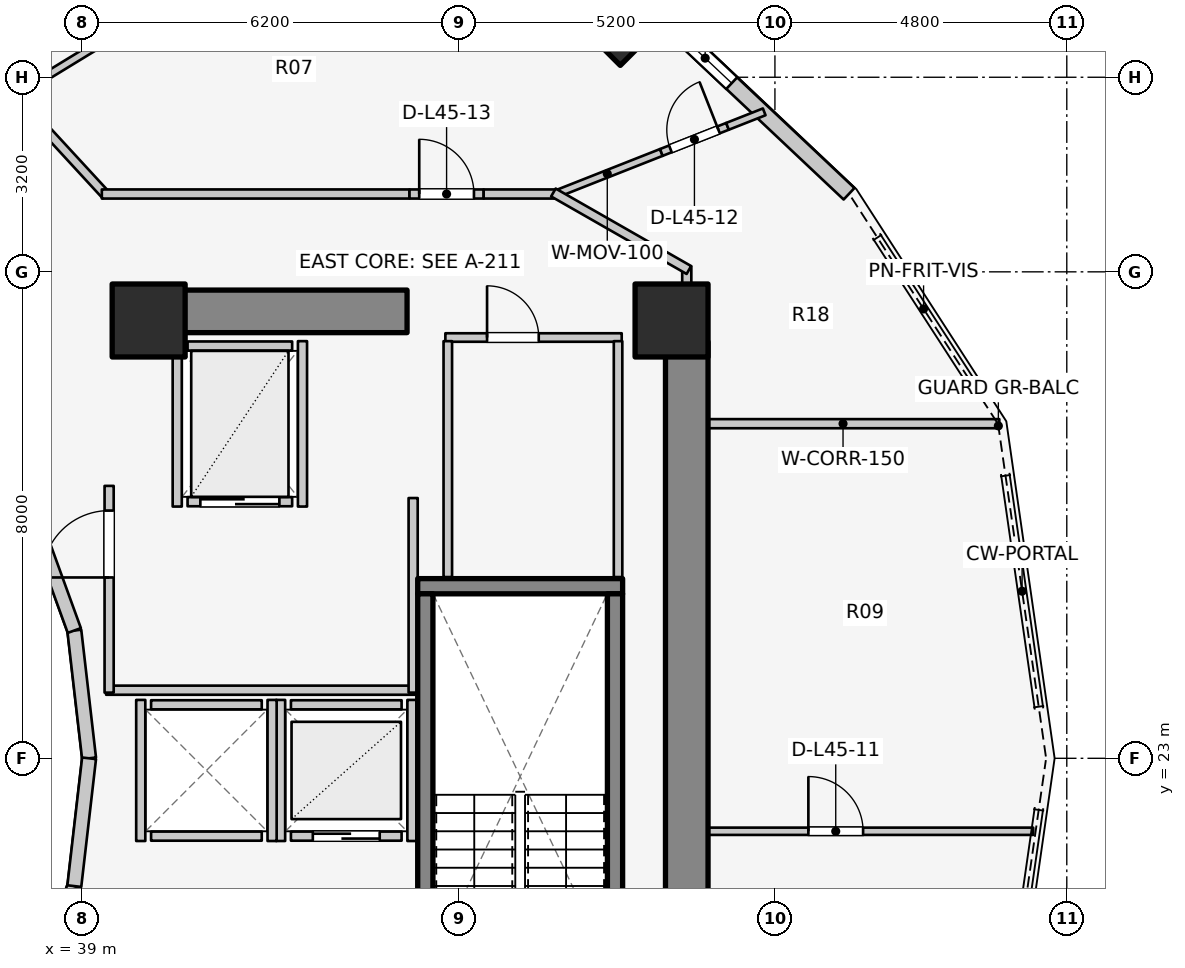
"""IFC4 building model, lengths in metres.
Left out: names, types, materials, properties, quantities, classifications, styles, units other than length and angle.
Written with IfcOpenShell. Run it as: python <this file> out.ifc"""

import sys

from ifc_helpers import new_model, si_unit, direction, frame, frame_2d, origin, origin_2d, place, context, subcontext, project, spatial, rectangle, extrude, element, fill, save


model = new_model("IFC4")
c1 = context("Model", 3, precision=1e-05, world=origin(), true_north=direction((0.0, 1.0)))
c2 = subcontext(c1, "Body", "Model", "MODEL_VIEW")
j1 = project(units=[si_unit("LENGTHUNIT", "METRE"), si_unit("PLANEANGLEUNIT", "RADIAN")], contexts=[c1])
p1 = place(None, origin())
s1 = spatial("IfcSite", under=j1, at=p1, CompositionType="ELEMENT")
p2 = place(p1, origin())
s2 = spatial("IfcBuilding", under=s1, at=p2, CompositionType="ELEMENT")
p3 = place(p2, frame((0.0, 0.0, 149.8)))
s3 = spatial("IfcBuildingStorey", under=s2, at=p3, CompositionType="ELEMENT", Elevation=149.8)
p4 = place(p3, frame((48.95, 17.05, 0.0), z_axis=(0.0, 0.0, 1.0), x_axis=(0.0, 1.0, 0.0)))
e1 = element("IfcWall", 1, at=p4, inside=s3, PredefinedType="SHEAR", context=c2, shape_type="SweptSolid", body=[
    extrude(rectangle(XDim=12.8, YDim=0.7, at=frame_2d((6.4, 0.0))), origin(), (0.0, 0.0, 1.0), 3.1),
])
p5 = place(p3, frame((39.85, 30.35, 0.0), z_axis=(0.0, 0.0, 1.0), x_axis=(1.0, 0.0, 0.0)))
e2 = element("IfcWall", 2, at=p5, inside=s3, PredefinedType="SHEAR", context=c2, shape_type="SweptSolid", body=[
    extrude(rectangle(XDim=4.5, YDim=0.7, at=frame_2d((2.25, 0.0))), origin(), (0.0, 0.0, 1.0), 3.1),
])
p6 = place(p3, frame((44.525, 25.83, 0.0), z_axis=(0.0, 0.0, 1.0), x_axis=(1.0, 0.0, 0.0)))
e3 = element("IfcWall", 3, at=p6, inside=s3, PredefinedType="SOLIDWALL", context=c2, shape_type="SweptSolid", body=[
    extrude(rectangle(XDim=3.37, YDim=0.25, at=frame_2d((1.685, 0.0))), origin(), (0.0, 0.0, 1.0), 3.1),
])
for number, where, z_axis, x_axis in (
    (4, (44.65, 17.895, 0.0), (0.0, 0.0, 1.0), (0.0, 1.0, 0.0)),
    (5, (47.77, 17.895, 0.0), (0.0, 0.0, 1.0), (0.0, 1.0, 0.0)),
):
    element("IfcWall", number, at=place(p3, frame(where, z_axis=z_axis, x_axis=x_axis)), inside=s3, PredefinedType="SOLIDWALL", context=c2, shape_type="SweptSolid", body=[
        extrude(rectangle(XDim=7.81, YDim=0.25, at=frame_2d((3.905, 0.0))), origin(), (0.0, 0.0, 1.0), 3.1),
    ])
for number, where, z_axis, x_axis in (
    (6, (48.7, 30.2, 0.0), (0.0, 0.0, 1.0), (1.0, 0.0, 0.0)),
    (7, (40.1, 30.2, 0.0), (0.0, 0.0, 1.0), (1.0, 0.0, 0.0)),
):
    element("IfcColumn", number, at=place(p3, frame(where, z_axis=z_axis, x_axis=x_axis)), inside=s3, PredefinedType="COLUMN", context=c2, shape_type="SweptSolid", body=[
        extrude(rectangle(XDim=1.2, YDim=1.2, at=origin_2d()), origin(), (0.0, 0.0, 1.0), 3.1),
    ])
p7 = place(p3, frame((47.857, 35.031, 0.0), z_axis=(0.0, 0.0, 1.0), x_axis=(0.707106781187, 0.707106781187, 0.0)))
e8 = element("IfcColumn", 8, at=p7, inside=s3, PredefinedType="COLUMN", context=c2, shape_type="SweptSolid", body=[
    extrude(rectangle(XDim=0.9, YDim=0.9, at=origin_2d()), origin(), (0.0, 0.0, 1.0), 3.1),
])
p8 = place(p3, frame((39.12, 23.0, 0.0), z_axis=(0.0, 0.0, 1.0), x_axis=(-0.114711713601, 0.993398823617, 0.0)))
e9 = element("IfcWall", 9, at=p8, inside=s3, PredefinedType="STANDARD", context=c2, shape_type="SweptSolid", body=[
    extrude(rectangle(XDim=2.115, YDim=0.23, at=frame_2d((1.058, 0.0))), origin(), (0.0, 0.0, 1.0), 2.56),
])
for number, where, z_axis, x_axis in (
    (10, (38.877, 25.102, 0.0), (0.0, 0.0, 1.0), (-0.341, 0.94, 0.0)),
    (11, (38.166, 18.94, 0.0), (0.0, 0.0, 1.0), (0.341, 0.94, 0.0)),
):
    element("IfcWall", number, at=place(p3, frame(where, z_axis=z_axis, x_axis=x_axis)), inside=s3, PredefinedType="STANDARD", context=c2, shape_type="SweptSolid", body=[
        extrude(rectangle(XDim=2.084, YDim=0.23, at=frame_2d((1.042, 0.0))), origin(), (0.0, 0.0, 1.0), 2.56),
    ])
p9 = place(p3, frame((38.877, 20.898, 0.0), z_axis=(0.0, 0.0, 1.0), x_axis=(0.114711713601, 0.993398823617, 0.0)))
e12 = element("IfcWall", 12, at=p9, inside=s3, PredefinedType="STANDARD", context=c2, shape_type="SweptSolid", body=[
    extrude(rectangle(XDim=2.115, YDim=0.23, at=frame_2d((1.058, 0.0))), origin(), (0.0, 0.0, 1.0), 2.56),
])
p10 = place(p3, frame((51.619, 32.284, 0.0), z_axis=(0.0, 0.0, 1.0), x_axis=(-0.727667301037, 0.68593024354, 0.0)))
e13 = element("IfcWall", 13, at=p10, inside=s3, PredefinedType="STANDARD", context=c2, shape_type="SweptSolid", body=[
    extrude(rectangle(XDim=4.604, YDim=0.26, at=frame_2d((2.302, 0.0))), origin(), (0.0, 0.0, 1.0), 1.22),
])
p11 = place(p10, frame((2.652, 0.0, 0.15)))
e14 = element("IfcOpeningElement", 14, at=p11, cuts=e13, PredefinedType="OPENING", context=c2, shape_type="SweptSolid", body=[
    extrude(rectangle(XDim=1.2, YDim=0.9, at=frame_2d((0.6, 0.45))), frame((0.0, 0.14, 0.0), z_axis=(0.0, -1.0, 0.0), x_axis=(1.0, 0.0, 0.0)), (0.0, 0.0, 1.0), 0.28),
])
p12 = place(p3, frame((42.44, 21.72, 0.0), z_axis=(0.0, 0.0, 1.0), x_axis=(1.0, 0.0, 0.0)))
e15 = element("IfcWall", 15, at=p12, inside=s3, PredefinedType="SOLIDWALL", context=c2, shape_type="SweptSolid", body=[
    extrude(rectangle(XDim=1.82, YDim=0.15, at=frame_2d((0.91, 0.0))), origin(), (0.0, 0.0, 1.0), 2.575),
])
p13 = place(p12, frame((0.36, 0.0, 0.0)))
e16 = element("IfcOpeningElement", 16, at=p13, cuts=e15, PredefinedType="OPENING", context=c2, shape_type="SweptSolid", body=[
    extrude(rectangle(XDim=1.1, YDim=2.1, at=frame_2d((0.55, 1.05))), frame((0.0, 0.085, 0.0), z_axis=(0.0, -1.0, 0.0), x_axis=(1.0, 0.0, 0.0)), (0.0, 0.0, 1.0), 0.17),
])
p14 = place(p3, frame((42.44, 23.88, 0.0), z_axis=(0.0, 0.0, 1.0), x_axis=(1.0, 0.0, 0.0)))
e17 = element("IfcWall", 17, at=p14, inside=s3, PredefinedType="SOLIDWALL", context=c2, shape_type="SweptSolid", body=[
    extrude(rectangle(XDim=1.82, YDim=0.15, at=frame_2d((0.91, 0.0))), origin(), (0.0, 0.0, 1.0), 2.575),
])
for number, where, z_axis, x_axis in (
    (18, (42.27, 21.64, 0.0), (0.0, 0.0, 1.0), (0.0, 1.0, 0.0)),
    (19, (44.43, 21.64, 0.0), (0.0, 0.0, 1.0), (0.0, 1.0, 0.0)),
):
    element("IfcWall", number, at=place(p3, frame(where, z_axis=z_axis, x_axis=x_axis)), inside=s3, PredefinedType="SOLIDWALL", context=c2, shape_type="SweptSolid", body=[
        extrude(rectangle(XDim=2.32, YDim=0.15, at=frame_2d((1.16, 0.0))), origin(), (0.0, 0.0, 1.0), 2.575),
    ])
for number, where, z_axis, x_axis in (
    (20, (40.14, 21.72, 0.0), (0.0, 0.0, 1.0), (1.0, 0.0, 0.0)),
    (21, (40.14, 23.88, 0.0), (0.0, 0.0, 1.0), (1.0, 0.0, 0.0)),
):
    element("IfcWall", number, at=place(p3, frame(where, z_axis=z_axis, x_axis=x_axis)), inside=s3, PredefinedType="SOLIDWALL", context=c2, shape_type="SweptSolid", body=[
        extrude(rectangle(XDim=1.82, YDim=0.15, at=frame_2d((0.91, 0.0))), origin(), (0.0, 0.0, 1.0), 2.12),
    ])
p15 = place(p3, frame((39.97, 21.64, 0.0), z_axis=(0.0, 0.0, 1.0), x_axis=(0.0, 1.0, 0.0)))
e22 = element("IfcWall", 22, at=p15, inside=s3, PredefinedType="SOLIDWALL", context=c2, shape_type="SweptSolid", body=[
    extrude(rectangle(XDim=2.32, YDim=0.15, at=frame_2d((1.16, 0.0))), origin(), (0.0, 0.0, 1.0), 2.12),
])
p16 = place(p3, frame((42.13, 21.64, 0.0), z_axis=(0.0, 0.0, 1.0), x_axis=(0.0, 1.0, 0.0)))
e23 = element("IfcWall", 23, at=p16, inside=s3, PredefinedType="SOLIDWALL", context=c2, shape_type="SweptSolid", body=[
    extrude(rectangle(XDim=2.32, YDim=0.15, at=frame_2d((1.16, 0.0))), origin(), (0.0, 0.0, 1.0), 2.575),
])
p17 = place(p3, frame((40.74, 27.22, 0.0), z_axis=(0.0, 0.0, 1.0), x_axis=(1.0, 0.0, 0.0)))
e24 = element("IfcWall", 24, at=p17, inside=s3, PredefinedType="SOLIDWALL", context=c2, shape_type="SweptSolid", body=[
    extrude(rectangle(XDim=1.72, YDim=0.15, at=frame_2d((0.86, 0.0))), origin(), (0.0, 0.0, 1.0), 2.575),
])
p18 = place(p17, frame((0.21, 0.0, 0.0)))
e25 = element("IfcOpeningElement", 25, at=p18, cuts=e24, PredefinedType="OPENING", context=c2, shape_type="SweptSolid", body=[
    extrude(rectangle(XDim=1.3, YDim=2.1, at=frame_2d((0.65, 1.05))), frame((0.0, 0.085, 0.0), z_axis=(0.0, -1.0, 0.0), x_axis=(1.0, 0.0, 0.0)), (0.0, 0.0, 1.0), 0.17),
])
p19 = place(p3, frame((40.74, 29.78, 0.0), z_axis=(0.0, 0.0, 1.0), x_axis=(1.0, 0.0, 0.0)))
e26 = element("IfcWall", 26, at=p19, inside=s3, PredefinedType="SOLIDWALL", context=c2, shape_type="SweptSolid", body=[
    extrude(rectangle(XDim=1.72, YDim=0.15, at=frame_2d((0.86, 0.0))), origin(), (0.0, 0.0, 1.0), 2.575),
])
for number, where, z_axis, x_axis in (
    (27, (40.57, 27.14, 0.0), (0.0, 0.0, 1.0), (0.0, 1.0, 0.0)),
    (28, (42.63, 27.14, 0.0), (0.0, 0.0, 1.0), (0.0, 1.0, 0.0)),
):
    element("IfcWall", number, at=place(p3, frame(where, z_axis=z_axis, x_axis=x_axis)), inside=s3, PredefinedType="SOLIDWALL", context=c2, shape_type="SweptSolid", body=[
        extrude(rectangle(XDim=2.72, YDim=0.15, at=frame_2d((1.36, 0.0))), origin(), (0.0, 0.0, 1.0), 2.575),
    ])
p20 = place(p3, frame((39.4, 24.12, 0.0), z_axis=(0.0, 0.0, 1.0), x_axis=(1.0, 0.0, 0.0)))
e29 = element("IfcWall", 29, at=p20, inside=s3, PredefinedType="PARTITIONING", context=c2, shape_type="SweptSolid", body=[
    extrude(rectangle(XDim=5.08, YDim=0.15, at=frame_2d((2.54, 0.0))), origin(), (0.0, 0.0, 1.0), 2.12),
])
p21 = place(p3, frame((44.45, 24.08, 0.0), z_axis=(0.0, 0.0, 1.0), x_axis=(0.0, 1.0, 0.0)))
e30 = element("IfcWall", 30, at=p21, inside=s3, PredefinedType="PARTITIONING", context=c2, shape_type="SweptSolid", body=[
    extrude(rectangle(XDim=3.2, YDim=0.15, at=frame_2d((1.6, 0.0))), origin(), (0.0, 0.0, 1.0), 2.575),
])
p22 = place(p3, frame((39.45, 24.08, 0.0), z_axis=(0.0, 0.0, 1.0), x_axis=(0.0, 1.0, 0.0)))
e31 = element("IfcWall", 31, at=p22, inside=s3, PredefinedType="PARTITIONING", context=c2, shape_type="SweptSolid", body=[
    extrude(rectangle(XDim=3.4, YDim=0.15, at=frame_2d((1.7, 0.0))), origin(), (0.0, 0.0, 1.0), 2.575),
])
p23 = place(p22, frame((1.894, 0.0, 0.0)))
e32 = element("IfcOpeningElement", 32, at=p23, cuts=e31, PredefinedType="OPENING", context=c2, shape_type="SweptSolid", body=[
    extrude(rectangle(XDim=1.1, YDim=2.1, at=frame_2d((0.55, 1.05))), frame((0.0, 0.085, 0.0), z_axis=(0.0, -1.0, 0.0), x_axis=(1.0, 0.0, 0.0)), (0.0, 0.0, 1.0), 0.17),
])
p24 = place(p3, frame((44.98, 29.92, 0.0), z_axis=(0.0, 0.0, 1.0), x_axis=(1.0, 0.0, 0.0)))
e33 = element("IfcWall", 33, at=p24, inside=s3, PredefinedType="PLUMBINGWALL", context=c2, shape_type="SweptSolid", body=[
    extrude(rectangle(XDim=2.9, YDim=0.14, at=frame_2d((1.45, 0.0))), origin(), (0.0, 0.0, 1.0), 2.575),
])
p25 = place(p24, frame((0.686, 0.0, 0.0)))
e34 = element("IfcOpeningElement", 34, at=p25, cuts=e33, PredefinedType="OPENING", context=c2, shape_type="SweptSolid", body=[
    extrude(rectangle(XDim=0.85, YDim=2.05, at=frame_2d((0.425, 1.025))), frame((0.0, 0.08, 0.0), z_axis=(0.0, -1.0, 0.0), x_axis=(1.0, 0.0, 0.0)), (0.0, 0.0, 1.0), 0.16),
])
for number, where, z_axis, x_axis in (
    (35, (45.02, 25.98, 0.0), (0.0, 0.0, 1.0), (0.0, 1.0, 0.0)),
    (36, (47.82, 25.98, 0.0), (0.0, 0.0, 1.0), (0.0, 1.0, 0.0)),
):
    element("IfcWall", number, at=place(p3, frame(where, z_axis=z_axis, x_axis=x_axis)), inside=s3, PredefinedType="PLUMBINGWALL", context=c2, shape_type="SweptSolid", body=[
        extrude(rectangle(XDim=3.88, YDim=0.14, at=frame_2d((1.94, 0.0))), origin(), (0.0, 0.0, 1.0), 2.575),
    ])
p26 = place(p3, frame((48.95, 28.503, 0.0), z_axis=(0.0, 0.0, 1.0), x_axis=(1.0, 0.0, 0.0)))
e37 = element("IfcWall", 37, at=p26, inside=s3, PredefinedType="PARTITIONING", context=c2, shape_type="SweptSolid", body=[
    extrude(rectangle(XDim=5.14, YDim=0.15, at=frame_2d((2.57, 0.0))), origin(), (0.0, 0.0, 1.0), 2.575),
])
p27 = place(p3, frame((48.95, 21.8, 0.0), z_axis=(0.0, 0.0, 1.0), x_axis=(1.0, 0.0, 0.0)))
e38 = element("IfcWall", 38, at=p27, inside=s3, PredefinedType="MOVABLE", context=c2, shape_type="SweptSolid", body=[
    extrude(rectangle(XDim=5.698, YDim=0.12, at=frame_2d((2.849, 0.0))), origin(), (0.0, 0.0, 1.0), 2.575),
])
p28 = place(p27, frame((2.0, 0.0, 0.0)))
e39 = element("IfcOpeningElement", 39, at=p28, cuts=e38, PredefinedType="OPENING", context=c2, shape_type="SweptSolid", body=[
    extrude(rectangle(XDim=0.9, YDim=2.1, at=frame_2d((0.45, 1.05))), frame((0.0, 0.07, 0.0), z_axis=(0.0, -1.0, 0.0), x_axis=(1.0, 0.0, 0.0)), (0.0, 0.0, 1.0), 0.14),
])
p29 = place(p3, frame((48.95, 29.8, 0.0), z_axis=(0.0, 0.0, 1.0), x_axis=(0.0, 1.0, 0.0)))
e40 = element("IfcWall", 40, at=p29, inside=s3, PredefinedType="PARTITIONING", context=c2, shape_type="SweptSolid", body=[
    extrude(rectangle(XDim=1.29, YDim=0.15, at=frame_2d((0.645, 0.0))), origin(), (0.0, 0.0, 1.0), 1.22),
])
p30 = place(p3, frame((46.753, 32.262, 0.0), z_axis=(0.0, 0.0, 1.0), x_axis=(0.930227502765, 0.36698336897, 0.0)))
e41 = element("IfcWall", 41, at=p30, inside=s3, PredefinedType="MOVABLE", context=c2, shape_type="SweptSolid", body=[
    extrude(rectangle(XDim=1.912, YDim=0.12, at=frame_2d((0.956, 0.0))), origin(), (0.0, 0.0, 1.0), 1.22),
])
p31 = place(p3, frame((48.532, 32.963, 0.0), z_axis=(0.0, 0.0, 1.0), x_axis=(0.93017960314, 0.367104761482, 0.0)))
e42 = element("IfcWall", 42, at=p31, inside=s3, PredefinedType="MOVABLE", context=c2, shape_type="SweptSolid", body=[
    extrude(rectangle(XDim=1.17, YDim=0.12, at=frame_2d((0.585, 0.0))), origin(), (0.0, 0.0, 1.0), 2.11),
])
p32 = place(p31, frame((0.16, 0.0, 0.0)))
e43 = element("IfcOpeningElement", 43, at=p32, cuts=e42, PredefinedType="OPENING", context=c2, shape_type="SweptSolid", body=[
    extrude(rectangle(XDim=0.85, YDim=2.05, at=frame_2d((0.425, 1.025))), frame((0.0, 0.07, 0.0), z_axis=(0.0, -1.0, 0.0), x_axis=(1.0, 0.0, 0.0)), (0.0, 0.0, 1.0), 0.14),
])
p33 = place(p3, frame((49.62, 33.393, 0.0), z_axis=(0.0, 0.0, 1.0), x_axis=(0.9301788827, 0.367106586945, 0.0)))
e44 = element("IfcWall", 44, at=p33, inside=s3, PredefinedType="MOVABLE", context=c2, shape_type="SweptSolid", body=[
    extrude(rectangle(XDim=0.649, YDim=0.12, at=frame_2d((0.325, 0.0))), origin(), (0.0, 0.0, 1.0), 2.575),
])
p34 = place(p3, frame((37.928, 33.856, 0.0), z_axis=(0.0, 0.0, 1.0), x_axis=(0.677579737957, -0.735449317567, 0.0)))
e45 = element("IfcWall", 45, at=p34, inside=s3, PredefinedType="PARTITIONING", context=c2, shape_type="SweptSolid", body=[
    extrude(rectangle(XDim=2.173, YDim=0.15, at=frame_2d((1.086, 0.0))), origin(), (0.0, 0.0, 1.0), 2.019),
])
p35 = place(p3, frame((39.33, 32.28, 0.0), z_axis=(0.0, 0.0, 1.0), x_axis=(1.0, 0.0, 0.0)))
e46 = element("IfcWall", 46, at=p35, inside=s3, PredefinedType="PARTITIONING", context=c2, shape_type="SweptSolid", body=[
    extrude(rectangle(XDim=5.06, YDim=0.15, at=frame_2d((2.53, 0.0))), origin(), (0.0, 0.0, 1.0), 2.019),
])
p36 = place(p3, frame((44.39, 32.28, 0.0), z_axis=(0.0, 0.0, 1.0), x_axis=(1.0, 0.0, 0.0)))
e47 = element("IfcWall", 47, at=p36, inside=s3, PredefinedType="PARTITIONING", context=c2, shape_type="SweptSolid", body=[
    extrude(rectangle(XDim=1.22, YDim=0.15, at=frame_2d((0.61, 0.0))), origin(), (0.0, 0.0, 1.0), 2.575),
])
p37 = place(p36, frame((0.16, 0.0, 0.0)))
e48 = element("IfcOpeningElement", 48, at=p37, cuts=e47, PredefinedType="OPENING", context=c2, shape_type="SweptSolid", body=[
    extrude(rectangle(XDim=0.9, YDim=2.1, at=frame_2d((0.45, 1.05))), frame((0.0, 0.085, 0.0), z_axis=(0.0, -1.0, 0.0), x_axis=(1.0, 0.0, 0.0)), (0.0, 0.0, 1.0), 0.17),
])
p38 = place(p3, frame((45.61, 32.28, 0.0), z_axis=(0.0, 0.0, 1.0), x_axis=(1.0, 0.0, 0.0)))
e49 = element("IfcWall", 49, at=p38, inside=s3, PredefinedType="PARTITIONING", context=c2, shape_type="SweptSolid", body=[
    extrude(rectangle(XDim=1.24, YDim=0.15, at=frame_2d((0.62, 0.0))), origin(), (0.0, 0.0, 1.0), 2.575),
])
p39 = place(p3, frame((46.757, 32.305, 0.0), z_axis=(0.0, 0.0, 1.0), x_axis=(0.867991349648, -0.496579315857, 0.0)))
e50 = element("IfcWall", 50, at=p39, inside=s3, PredefinedType="PARTITIONING", context=c2, shape_type="SweptSolid", body=[
    extrude(rectangle(XDim=2.567, YDim=0.15, at=frame_2d((1.283, 0.0))), origin(), (0.0, 0.0, 1.0), 1.22),
])
p40 = place(p3, frame((37.938, 33.925, 0.0), z_axis=(0.0, 0.0, 1.0), x_axis=(0.853440334679, 0.521190555501, 0.0)))
e51 = element("IfcWall", 51, at=p40, inside=s3, PredefinedType="PARTITIONING", context=c2, shape_type="SweptSolid", body=[
    extrude(rectangle(XDim=6.966, YDim=0.125, at=frame_2d((3.483, 0.0))), origin(), (0.0, 0.0, 1.0), 1.22),
])
p41 = place(p11, origin())
e52 = element("IfcWindow", 52, at=p41, inside=s3, PartitioningType="SINGLE_PANEL", PredefinedType="WINDOW", context=c2, shape_type="SweptSolid", body=[
    extrude(rectangle(XDim=1.2, YDim=0.9, at=frame_2d((0.6, 0.45))), frame((0.0, 0.03, 0.0), z_axis=(0.0, -1.0, 0.0), x_axis=(1.0, 0.0, 0.0)), (0.0, 0.0, 1.0), 0.06),
])
fill(e14, e52)
p42 = place(p13, origin())
e53 = element("IfcDoor", 53, at=p42, inside=s3, OperationType="DOUBLE_DOOR_SLIDING", PredefinedType="DOOR", context=c2, shape_type="SweptSolid", body=[
    extrude(rectangle(XDim=1.1, YDim=2.1, at=frame_2d((0.55, 1.05))), frame((0.0, 0.025, 0.0), z_axis=(0.0, -1.0, 0.0), x_axis=(1.0, 0.0, 0.0)), (0.0, 0.0, 1.0), 0.05),
])
fill(e16, e53)
p43 = place(p18, origin())
e54 = element("IfcDoor", 54, at=p43, inside=s3, OperationType="DOUBLE_DOOR_SLIDING", PredefinedType="DOOR", context=c2, shape_type="SweptSolid", body=[
    extrude(rectangle(XDim=1.3, YDim=2.1, at=frame_2d((0.65, 1.05))), frame((0.0, 0.025, 0.0), z_axis=(0.0, -1.0, 0.0), x_axis=(1.0, 0.0, 0.0)), (0.0, 0.0, 1.0), 0.05),
])
fill(e25, e54)
p44 = place(p23, origin())
e55 = element("IfcDoor", 55, at=p44, inside=s3, OperationType="SINGLE_SWING_LEFT", PredefinedType="DOOR", context=c2, shape_type="SweptSolid", body=[
    extrude(rectangle(XDim=1.1, YDim=2.1, at=frame_2d((0.55, 1.05))), frame((0.0, 0.025, 0.0), z_axis=(0.0, -1.0, 0.0), x_axis=(1.0, 0.0, 0.0)), (0.0, 0.0, 1.0), 0.05),
])
fill(e32, e55)
p45 = place(p25, origin())
e56 = element("IfcDoor", 56, at=p45, inside=s3, OperationType="SINGLE_SWING_LEFT", PredefinedType="DOOR", context=c2, shape_type="SweptSolid", body=[
    extrude(rectangle(XDim=0.85, YDim=2.05, at=frame_2d((0.425, 1.025))), frame((0.0, 0.025, 0.0), z_axis=(0.0, -1.0, 0.0), x_axis=(1.0, 0.0, 0.0)), (0.0, 0.0, 1.0), 0.05),
])
fill(e34, e56)
p46 = place(p28, origin())
e57 = element("IfcDoor", 57, at=p46, inside=s3, OperationType="SINGLE_SWING_LEFT", PredefinedType="DOOR", context=c2, shape_type="SweptSolid", body=[
    extrude(rectangle(XDim=0.9, YDim=2.1, at=frame_2d((0.45, 1.05))), frame((0.0, 0.025, 0.0), z_axis=(0.0, -1.0, 0.0), x_axis=(1.0, 0.0, 0.0)), (0.0, 0.0, 1.0), 0.05),
])
fill(e39, e57)
p47 = place(p32, origin())
e58 = element("IfcDoor", 58, at=p47, inside=s3, OperationType="SINGLE_SWING_RIGHT", PredefinedType="DOOR", context=c2, shape_type="SweptSolid", body=[
    extrude(rectangle(XDim=0.85, YDim=2.05, at=frame_2d((0.425, 1.025))), frame((0.0, 0.025, 0.0), z_axis=(0.0, -1.0, 0.0), x_axis=(1.0, 0.0, 0.0)), (0.0, 0.0, 1.0), 0.05),
])
fill(e43, e58)
p48 = place(p37, origin())
e59 = element("IfcDoor", 59, at=p48, inside=s3, OperationType="SINGLE_SWING_LEFT", PredefinedType="DOOR", context=c2, shape_type="SweptSolid", body=[
    extrude(rectangle(XDim=0.9, YDim=2.1, at=frame_2d((0.45, 1.05))), frame((0.0, 0.025, 0.0), z_axis=(0.0, -1.0, 0.0), x_axis=(1.0, 0.0, 0.0)), (0.0, 0.0, 1.0), 0.05),
])
fill(e48, e59)
save(model, sys.argv[1])
